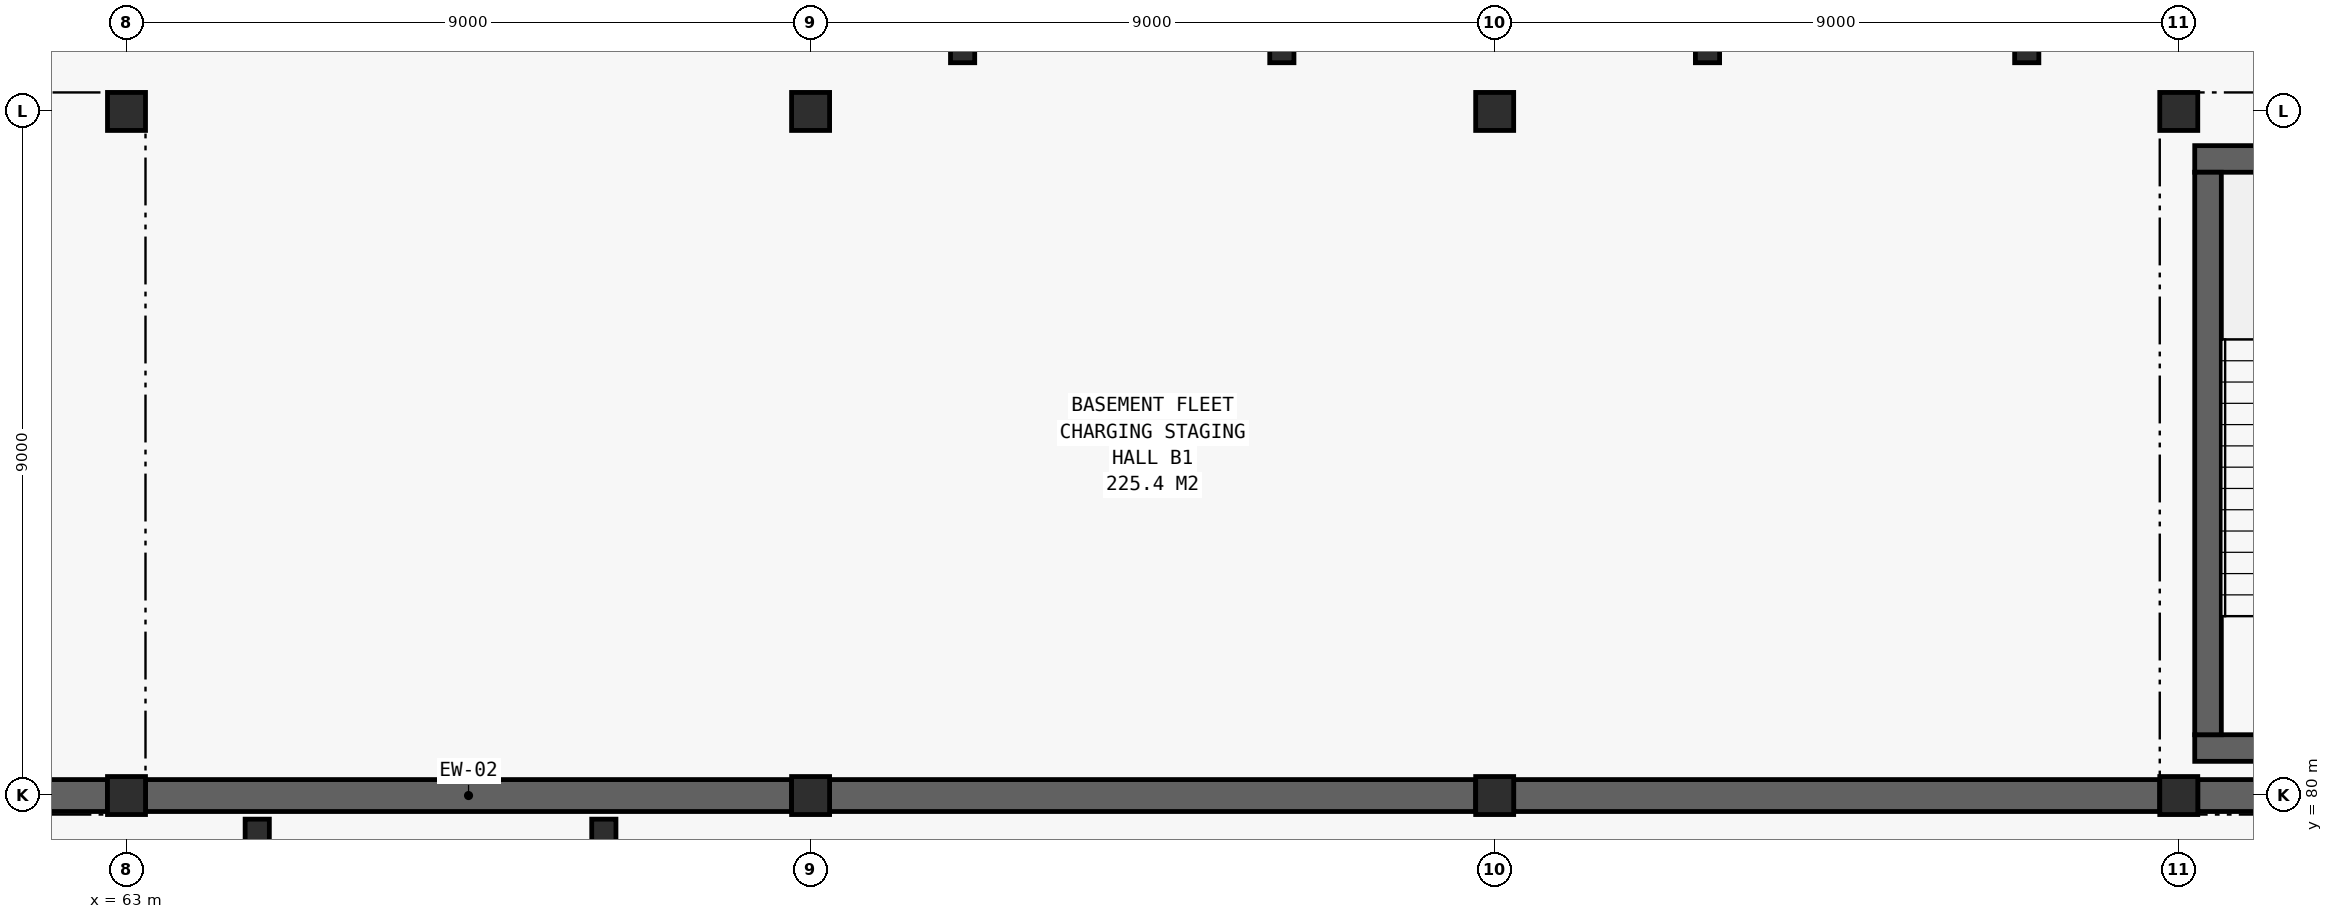
"""IFC4 building model, lengths in metres.
Left out: names, types, materials, properties, quantities, classifications, styles, units other than length and angle.
Written with IfcOpenShell. Run it as: python <this file> out.ifc"""

import sys

from ifc_helpers import new_model, si_unit, direction, frame, frame_2d, origin, origin_2d, place, context, subcontext, project, spatial, rectangle, hollow_rectangle, hollow_circle, extrude, element, save


model = new_model("IFC4")
c1 = context("Model", 3, precision=1e-05, world=origin(), true_north=direction((0.0, 1.0)))
c2 = subcontext(c1, "Body", "Model", "MODEL_VIEW")
j1 = project(units=[si_unit("LENGTHUNIT", "METRE"), si_unit("PLANEANGLEUNIT", "RADIAN")], contexts=[c1])
p1 = place(None, origin())
s1 = spatial("IfcSite", under=j1, at=p1, CompositionType="ELEMENT")
p2 = place(p1, origin())
s2 = spatial("IfcBuilding", under=s1, at=p2, CompositionType="ELEMENT")
p3 = place(p2, frame((0.0, 0.0, -4.8)))
s3 = spatial("IfcBuildingStorey", under=s2, at=p3, CompositionType="ELEMENT", Elevation=-4.8)
for number, where, z_axis, x_axis in (
    (1, (63.0, 80.0, 0.0), (0.0, 0.0, 1.0), (1.0, 0.0, 0.0)),
    (2, (63.0, 89.0, 0.0), (0.0, 0.0, 1.0), (1.0, 0.0, 0.0)),
):
    element("IfcColumn", number, at=place(p3, frame(where, z_axis=z_axis, x_axis=x_axis)), inside=s3, PredefinedType="COLUMN", context=c2, shape_type="SweptSolid", body=[
        extrude(hollow_rectangle(XDim=0.5, YDim=0.5, WallThickness=0.025, at=origin_2d()), origin(), (0.0, 0.0, 1.0), 4.8),
    ])
for number, where, z_axis, x_axis in (
    (3, (64.72, 79.53, 0.0), (0.0, 0.0, 1.0), (1.0, 0.0, 0.0)),
    (4, (69.28, 79.53, 0.0), (0.0, 0.0, 1.0), (1.0, 0.0, 0.0)),
):
    element("IfcColumn", number, at=place(p3, frame(where, z_axis=z_axis, x_axis=x_axis)), inside=s3, PredefinedType="COLUMN", context=c2, shape_type="SweptSolid", body=[
        extrude(hollow_circle(Radius=0.159, WallThickness=0.01, at=origin_2d()), origin(), (0.0, 0.0, 1.0), 4.8),
    ])
for number, where, z_axis, x_axis in (
    (5, (72.0, 80.0, 0.0), (0.0, 0.0, 1.0), (1.0, 0.0, 0.0)),
    (6, (72.0, 89.0, 0.0), (0.0, 0.0, 1.0), (1.0, 0.0, 0.0)),
):
    element("IfcColumn", number, at=place(p3, frame(where, z_axis=z_axis, x_axis=x_axis)), inside=s3, PredefinedType="COLUMN", context=c2, shape_type="SweptSolid", body=[
        extrude(hollow_rectangle(XDim=0.5, YDim=0.5, WallThickness=0.025, at=origin_2d()), origin(), (0.0, 0.0, 1.0), 4.8),
    ])
for number, where, z_axis, x_axis in (
    (7, (74.0, 89.8, 0.0), (0.0, 0.0, 1.0), (1.0, 0.0, 0.0)),
    (8, (78.2, 89.8, 0.0), (0.0, 0.0, 1.0), (1.0, 0.0, 0.0)),
):
    element("IfcColumn", number, at=place(p3, frame(where, z_axis=z_axis, x_axis=x_axis)), inside=s3, PredefinedType="COLUMN", context=c2, shape_type="SweptSolid", body=[
        extrude(hollow_circle(Radius=0.159, WallThickness=0.01, at=origin_2d()), origin(), (0.0, 0.0, 1.0), 4.52),
    ])
for number, where, z_axis, x_axis in (
    (9, (81.0, 80.0, 0.0), (0.0, 0.0, 1.0), (1.0, 0.0, 0.0)),
    (10, (81.0, 89.0, 0.0), (0.0, 0.0, 1.0), (1.0, 0.0, 0.0)),
):
    element("IfcColumn", number, at=place(p3, frame(where, z_axis=z_axis, x_axis=x_axis)), inside=s3, PredefinedType="COLUMN", context=c2, shape_type="SweptSolid", body=[
        extrude(hollow_rectangle(XDim=0.5, YDim=0.5, WallThickness=0.025, at=origin_2d()), origin(), (0.0, 0.0, 1.0), 4.8),
    ])
for number, where, z_axis, x_axis in (
    (11, (83.8, 89.8, 0.0), (0.0, 0.0, 1.0), (1.0, 0.0, 0.0)),
    (12, (88.0, 89.8, 0.0), (0.0, 0.0, 1.0), (1.0, 0.0, 0.0)),
):
    element("IfcColumn", number, at=place(p3, frame(where, z_axis=z_axis, x_axis=x_axis)), inside=s3, PredefinedType="COLUMN", context=c2, shape_type="SweptSolid", body=[
        extrude(hollow_circle(Radius=0.159, WallThickness=0.01, at=origin_2d()), origin(), (0.0, 0.0, 1.0), 4.8),
    ])
for number, where, z_axis, x_axis in (
    (13, (90.0, 80.0, 0.0), (0.0, 0.0, 1.0), (1.0, 0.0, 0.0)),
    (14, (90.0, 89.0, 0.0), (0.0, 0.0, 1.0), (1.0, 0.0, 0.0)),
):
    element("IfcColumn", number, at=place(p3, frame(where, z_axis=z_axis, x_axis=x_axis)), inside=s3, PredefinedType="COLUMN", context=c2, shape_type="SweptSolid", body=[
        extrude(hollow_rectangle(XDim=0.5, YDim=0.5, WallThickness=0.025, at=origin_2d()), origin(), (0.0, 0.0, 1.0), 4.8),
    ])
for number, where, z_axis, x_axis in (
    (15, (54.25, 80.0, 0.0), (0.0, 0.0, 1.0), (1.0, 0.0, 0.0)),
    (16, (63.25, 80.0, 0.0), (0.0, 0.0, 1.0), (1.0, 0.0, 0.0)),
    (17, (72.25, 80.0, 0.0), (0.0, 0.0, 1.0), (1.0, 0.0, 0.0)),
    (18, (81.25, 80.0, 0.0), (0.0, 0.0, 1.0), (1.0, 0.0, 0.0)),
    (19, (90.25, 80.0, 0.0), (0.0, 0.0, 1.0), (1.0, 0.0, 0.0)),
):
    element("IfcWall", number, at=place(p3, frame(where, z_axis=z_axis, x_axis=x_axis)), inside=s3, PredefinedType="USERDEFINED", context=c2, shape_type="SweptSolid", body=[
        extrude(rectangle(XDim=8.5, YDim=0.42, at=frame_2d((4.25, 0.0))), origin(), (0.0, 0.0, 1.0), 4.13),
    ])
for number, where, z_axis, x_axis in (
    (20, (90.21, 80.625, 0.0), (0.0, 0.0, 1.0), (1.0, 0.0, 0.0)),
    (21, (90.21, 88.375, 0.0), (0.0, 0.0, 1.0), (1.0, 0.0, 0.0)),
):
    element("IfcWall", number, at=place(p3, frame(where, z_axis=z_axis, x_axis=x_axis)), inside=s3, PredefinedType="SHEAR", context=c2, shape_type="SweptSolid", body=[
        extrude(rectangle(XDim=3.98, YDim=0.35, at=frame_2d((1.99, 0.0))), origin(), (0.0, 0.0, 1.0), 4.52),
    ])
p4 = place(p3, frame((90.385, 80.8, 0.0), z_axis=(0.0, 0.0, 1.0), x_axis=(0.0, 1.0, 0.0)))
e22 = element("IfcWall", 22, at=p4, inside=s3, PredefinedType="SHEAR", context=c2, shape_type="SweptSolid", body=[
    extrude(rectangle(XDim=7.4, YDim=0.35, at=frame_2d((3.7, 0.0))), origin(), (0.0, 0.0, 1.0), 4.52),
])
save(model, sys.argv[1])
